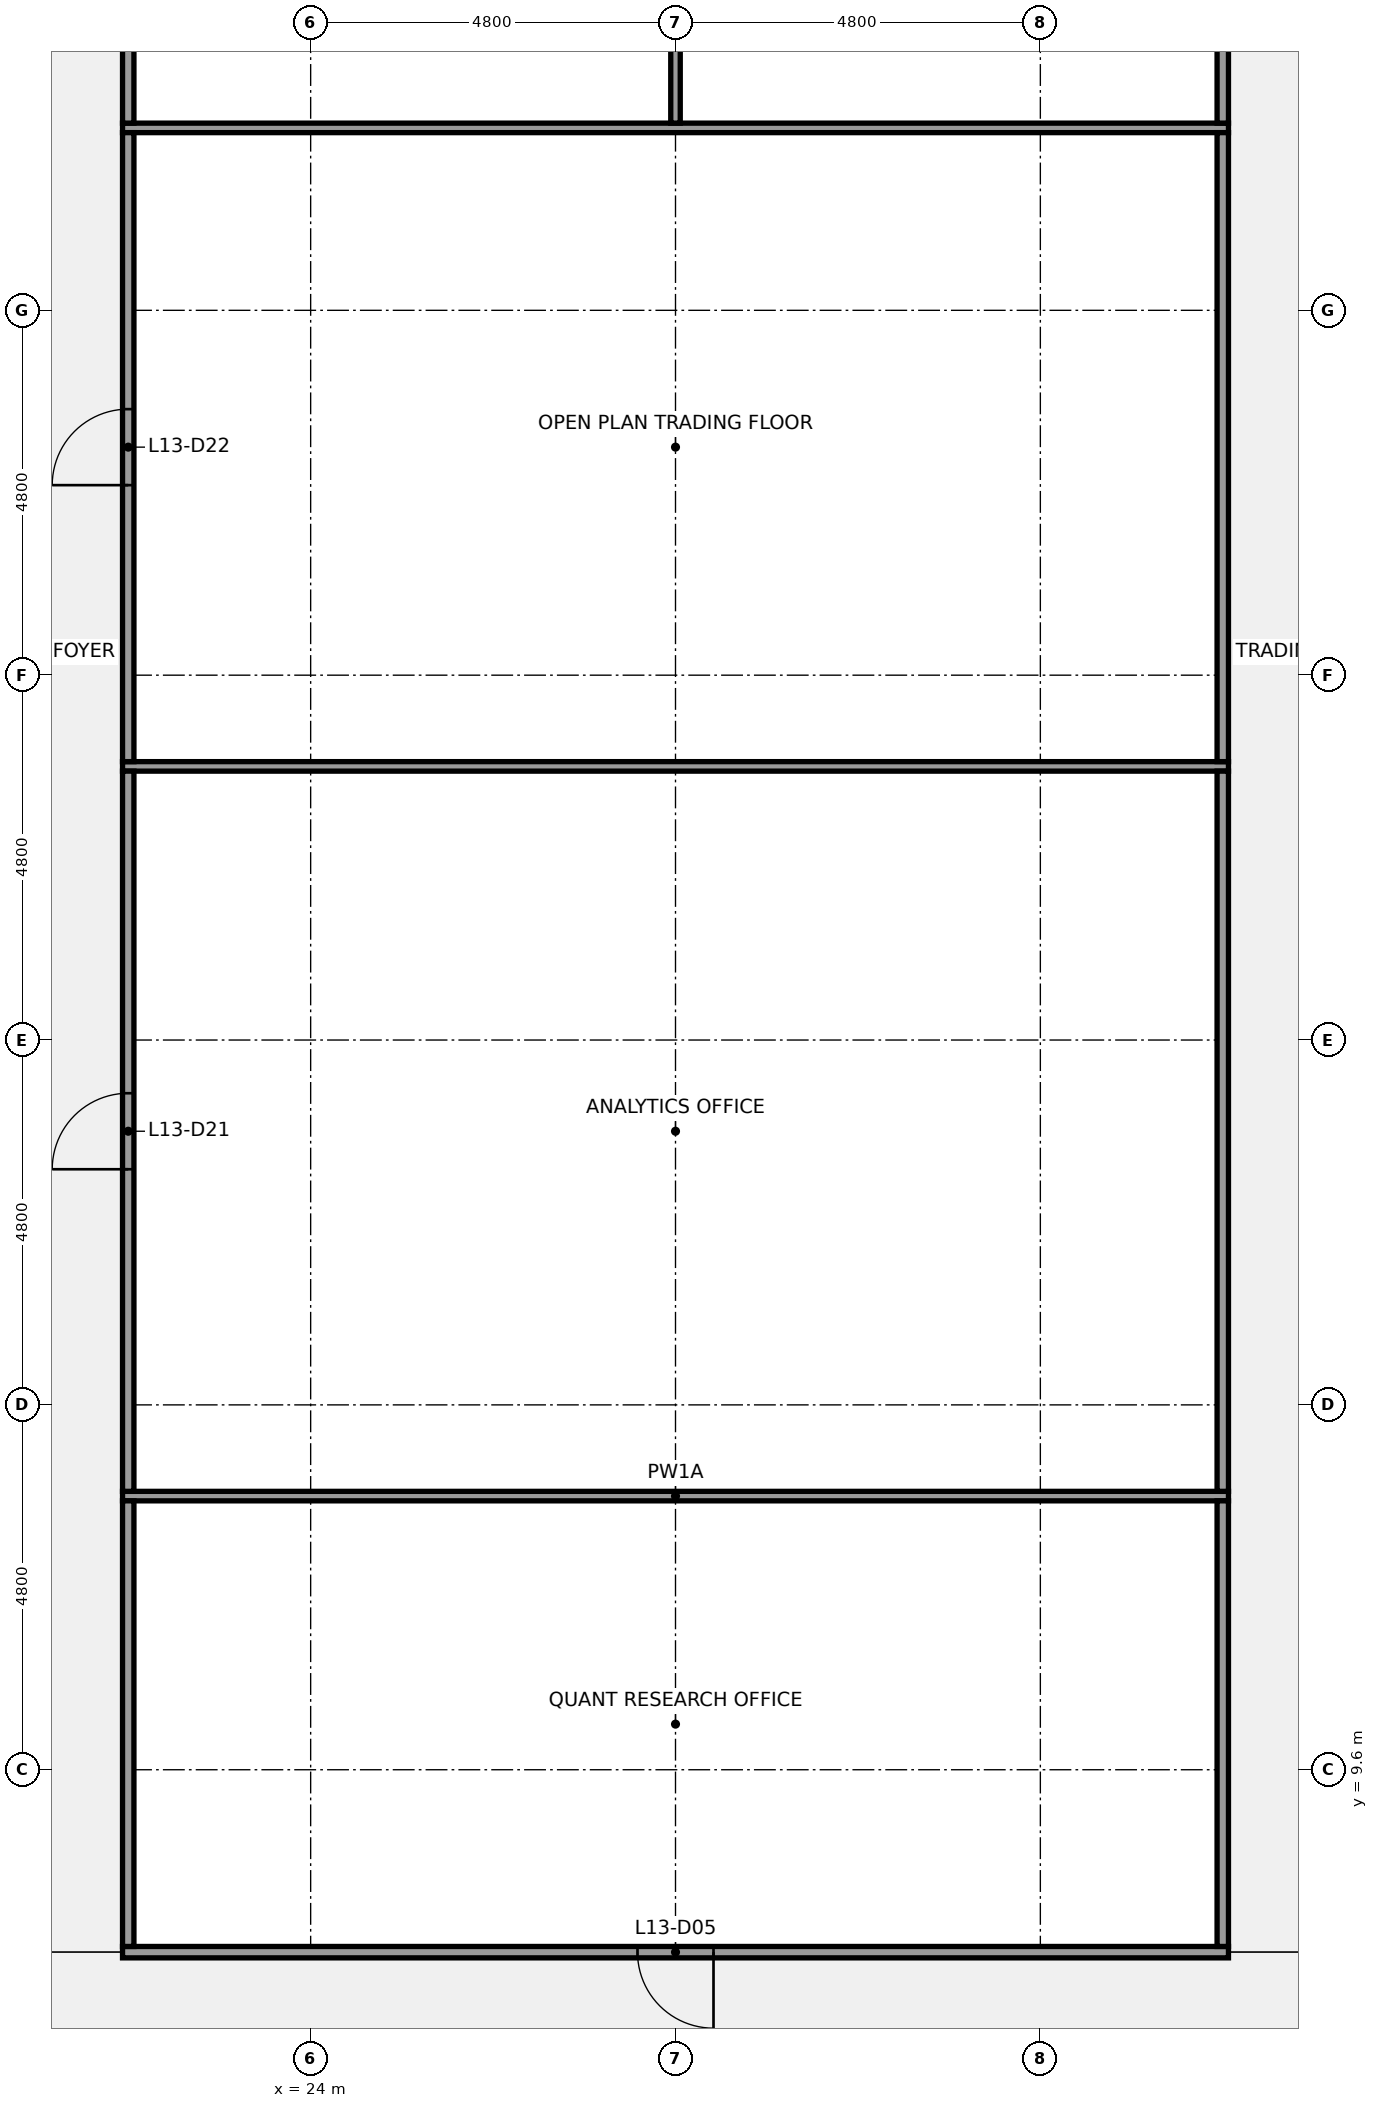
"""IFC4 building model, lengths in metres.
Left out: names, types, materials, properties, quantities, classifications, styles, units other than length and angle.
Written with IfcOpenShell. Run it as: python <this file> out.ifc"""

import sys

from ifc_helpers import new_model, si_unit, direction, frame, frame_2d, origin, place, context, subcontext, project, spatial, rectangle, extrude, element, fill, save


model = new_model("IFC4")
c1 = context("Model", 3, precision=1e-05, world=origin(), true_north=direction((0.0, 1.0)))
c2 = subcontext(c1, "Body", "Model", "MODEL_VIEW")
j1 = project(units=[si_unit("LENGTHUNIT", "METRE"), si_unit("PLANEANGLEUNIT", "RADIAN")], contexts=[c1])
p1 = place(None, origin())
s1 = spatial("IfcSite", under=j1, at=p1, CompositionType="ELEMENT")
p2 = place(p1, origin())
s2 = spatial("IfcBuilding", under=s1, at=p2, CompositionType="ELEMENT")
p3 = place(p2, frame((0.0, 0.0, 63.0)))
s3 = spatial("IfcBuildingStorey", under=s2, at=p3, CompositionType="ELEMENT", Elevation=63.0)
p4 = place(p3, frame((21.525, 7.2, 0.0), z_axis=(0.0, 0.0, 1.0), x_axis=(1.0, 0.0, 0.0)))
e1 = element("IfcWall", 1, at=p4, inside=s3, PredefinedType="PARTITIONING", context=c2, shape_type="SweptSolid", body=[
    extrude(rectangle(XDim=14.55, YDim=0.15, at=frame_2d((7.275, 0.0))), origin(), (0.0, 0.0, 1.0), 2.87),
])
p5 = place(p4, frame((6.775, 0.0, 0.0)))
e2 = element("IfcOpeningElement", 2, at=p5, cuts=e1, PredefinedType="OPENING", context=c2, shape_type="SweptSolid", body=[
    extrude(rectangle(XDim=1.0, YDim=2.1, at=frame_2d((0.5, 1.05))), frame((0.0, 0.085, 0.0), z_axis=(0.0, -1.0, 0.0), x_axis=(1.0, 0.0, 0.0)), (0.0, 0.0, 1.0), 0.17),
])
for number, where, z_axis, x_axis in (
    (3, (21.525, 13.2, 0.0), (0.0, 0.0, 1.0), (1.0, 0.0, 0.0)),
    (4, (21.525, 22.8, 0.0), (0.0, 0.0, 1.0), (1.0, 0.0, 0.0)),
    (5, (21.525, 31.2, 0.0), (0.0, 0.0, 1.0), (1.0, 0.0, 0.0)),
):
    element("IfcWall", number, at=place(p3, frame(where, z_axis=z_axis, x_axis=x_axis)), inside=s3, PredefinedType="PARTITIONING", context=c2, shape_type="SweptSolid", body=[
        extrude(rectangle(XDim=14.55, YDim=0.125, at=frame_2d((7.275, 0.0))), origin(), (0.0, 0.0, 1.0), 2.87),
    ])
p6 = place(p3, frame((21.6, 7.275, 0.0), z_axis=(0.0, 0.0, 1.0), x_axis=(0.0, 1.0, 0.0)))
e6 = element("IfcWall", 6, at=p6, inside=s3, PredefinedType="PARTITIONING", context=c2, shape_type="SweptSolid", body=[
    extrude(rectangle(XDim=5.863, YDim=0.15, at=frame_2d((2.931, 0.0))), origin(), (0.0, 0.0, 1.0), 2.87),
])
p7 = place(p3, frame((21.6, 13.262, 0.0), z_axis=(0.0, 0.0, 1.0), x_axis=(0.0, 1.0, 0.0)))
e7 = element("IfcWall", 7, at=p7, inside=s3, PredefinedType="PARTITIONING", context=c2, shape_type="SweptSolid", body=[
    extrude(rectangle(XDim=9.475, YDim=0.15, at=frame_2d((4.738, 0.0))), origin(), (0.0, 0.0, 1.0), 2.87),
])
p8 = place(p7, frame((4.238, 0.0, 0.0)))
e8 = element("IfcOpeningElement", 8, at=p8, cuts=e7, PredefinedType="OPENING", context=c2, shape_type="SweptSolid", body=[
    extrude(rectangle(XDim=1.0, YDim=2.1, at=frame_2d((0.5, 1.05))), frame((0.0, 0.085, 0.0), z_axis=(0.0, -1.0, 0.0), x_axis=(1.0, 0.0, 0.0)), (0.0, 0.0, 1.0), 0.17),
])
p9 = place(p3, frame((21.6, 22.863, 0.0), z_axis=(0.0, 0.0, 1.0), x_axis=(0.0, 1.0, 0.0)))
e9 = element("IfcWall", 9, at=p9, inside=s3, PredefinedType="PARTITIONING", context=c2, shape_type="SweptSolid", body=[
    extrude(rectangle(XDim=8.275, YDim=0.15, at=frame_2d((4.137, 0.0))), origin(), (0.0, 0.0, 1.0), 2.87),
])
p10 = place(p9, frame((3.637, 0.0, 0.0)))
e10 = element("IfcOpeningElement", 10, at=p10, cuts=e9, PredefinedType="OPENING", context=c2, shape_type="SweptSolid", body=[
    extrude(rectangle(XDim=1.0, YDim=2.1, at=frame_2d((0.5, 1.05))), frame((0.0, 0.085, 0.0), z_axis=(0.0, -1.0, 0.0), x_axis=(1.0, 0.0, 0.0)), (0.0, 0.0, 1.0), 0.17),
])
p11 = place(p3, frame((21.6, 31.262, 0.0), z_axis=(0.0, 0.0, 1.0), x_axis=(0.0, 1.0, 0.0)))
e11 = element("IfcWall", 11, at=p11, inside=s3, PredefinedType="PARTITIONING", context=c2, shape_type="SweptSolid", body=[
    extrude(rectangle(XDim=5.875, YDim=0.15, at=frame_2d((2.938, 0.0))), origin(), (0.0, 0.0, 1.0), 2.87),
])
p12 = place(p11, frame((2.438, 0.0, 0.0)))
e12 = element("IfcOpeningElement", 12, at=p12, cuts=e11, PredefinedType="OPENING", context=c2, shape_type="SweptSolid", body=[
    extrude(rectangle(XDim=1.0, YDim=2.1, at=frame_2d((0.5, 1.05))), frame((0.0, 0.085, 0.0), z_axis=(0.0, -1.0, 0.0), x_axis=(1.0, 0.0, 0.0)), (0.0, 0.0, 1.0), 0.17),
])
p13 = place(p3, frame((28.8, 31.262, 0.0), z_axis=(0.0, 0.0, 1.0), x_axis=(0.0, 1.0, 0.0)))
e13 = element("IfcWall", 13, at=p13, inside=s3, PredefinedType="PARTITIONING", context=c2, shape_type="SweptSolid", body=[
    extrude(rectangle(XDim=5.875, YDim=0.125, at=frame_2d((2.938, 0.0))), origin(), (0.0, 0.0, 1.0), 2.87),
])
p14 = place(p3, frame((36.0, 7.275, 0.0), z_axis=(0.0, 0.0, 1.0), x_axis=(0.0, 1.0, 0.0)))
e14 = element("IfcWall", 14, at=p14, inside=s3, PredefinedType="PARTITIONING", context=c2, shape_type="SweptSolid", body=[
    extrude(rectangle(XDim=5.863, YDim=0.15, at=frame_2d((2.931, 0.0))), origin(), (0.0, 0.0, 1.0), 2.87),
])
p15 = place(p3, frame((36.0, 13.262, 0.0), z_axis=(0.0, 0.0, 1.0), x_axis=(0.0, 1.0, 0.0)))
e15 = element("IfcWall", 15, at=p15, inside=s3, PredefinedType="PARTITIONING", context=c2, shape_type="SweptSolid", body=[
    extrude(rectangle(XDim=9.475, YDim=0.15, at=frame_2d((4.738, 0.0))), origin(), (0.0, 0.0, 1.0), 2.87),
])
p16 = place(p3, frame((36.0, 22.863, 0.0), z_axis=(0.0, 0.0, 1.0), x_axis=(0.0, 1.0, 0.0)))
e16 = element("IfcWall", 16, at=p16, inside=s3, PredefinedType="PARTITIONING", context=c2, shape_type="SweptSolid", body=[
    extrude(rectangle(XDim=8.275, YDim=0.15, at=frame_2d((4.137, 0.0))), origin(), (0.0, 0.0, 1.0), 2.87),
])
p17 = place(p3, frame((36.0, 31.262, 0.0), z_axis=(0.0, 0.0, 1.0), x_axis=(0.0, 1.0, 0.0)))
e17 = element("IfcWall", 17, at=p17, inside=s3, PredefinedType="PARTITIONING", context=c2, shape_type="SweptSolid", body=[
    extrude(rectangle(XDim=5.875, YDim=0.15, at=frame_2d((2.938, 0.0))), origin(), (0.0, 0.0, 1.0), 2.87),
])
p18 = place(p17, frame((2.438, 0.0, 0.0)))
e18 = element("IfcOpeningElement", 18, at=p18, cuts=e17, PredefinedType="OPENING", context=c2, shape_type="SweptSolid", body=[
    extrude(rectangle(XDim=1.0, YDim=2.1, at=frame_2d((0.5, 1.05))), frame((0.0, 0.085, 0.0), z_axis=(0.0, -1.0, 0.0), x_axis=(1.0, 0.0, 0.0)), (0.0, 0.0, 1.0), 0.17),
])
p19 = place(p5, origin())
e19 = element("IfcDoor", 19, at=p19, inside=s3, OperationType="SINGLE_SWING_RIGHT", PredefinedType="DOOR", context=c2, shape_type="SweptSolid", body=[
    extrude(rectangle(XDim=1.0, YDim=2.1, at=frame_2d((0.5, 1.05))), frame((0.0, 0.025, 0.0), z_axis=(0.0, -1.0, 0.0), x_axis=(1.0, 0.0, 0.0)), (0.0, 0.0, 1.0), 0.05),
])
fill(e2, e19)
p20 = place(p8, origin())
e20 = element("IfcDoor", 20, at=p20, inside=s3, OperationType="SINGLE_SWING_LEFT", PredefinedType="DOOR", context=c2, shape_type="SweptSolid", body=[
    extrude(rectangle(XDim=1.0, YDim=2.1, at=frame_2d((0.5, 1.05))), frame((0.0, 0.025, 0.0), z_axis=(0.0, -1.0, 0.0), x_axis=(1.0, 0.0, 0.0)), (0.0, 0.0, 1.0), 0.05),
])
fill(e8, e20)
p21 = place(p10, origin())
e21 = element("IfcDoor", 21, at=p21, inside=s3, OperationType="SINGLE_SWING_LEFT", PredefinedType="DOOR", context=c2, shape_type="SweptSolid", body=[
    extrude(rectangle(XDim=1.0, YDim=2.1, at=frame_2d((0.5, 1.05))), frame((0.0, 0.025, 0.0), z_axis=(0.0, -1.0, 0.0), x_axis=(1.0, 0.0, 0.0)), (0.0, 0.0, 1.0), 0.05),
])
fill(e10, e21)
save(model, sys.argv[1])
